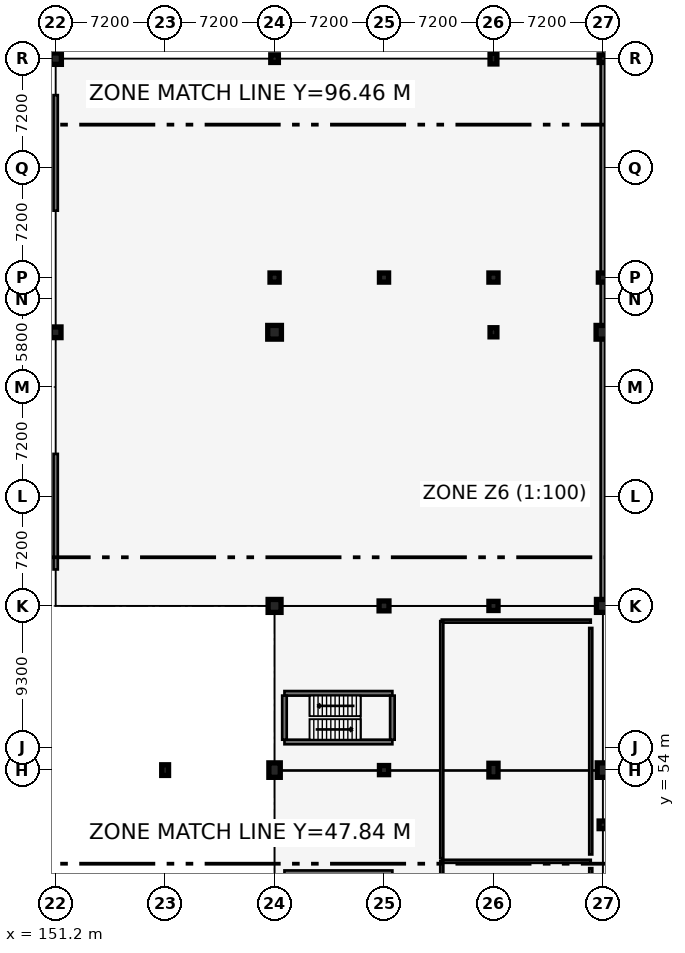
"""IFC4 building model, lengths in metres.
Left out: names, types, materials, properties, quantities, classifications, styles, units other than length and angle.
Written with IfcOpenShell. Run it as: python <this file> out.ifc"""

import sys

from ifc_helpers import new_model, si_unit, direction, frame, frame_2d, origin, origin_2d, place, context, subcontext, project, spatial, rectangle, circle, extrude, element, fill, save


model = new_model("IFC4")
c1 = context("Model", 3, precision=1e-05, world=origin(), true_north=direction((0.0, 1.0)))
c2 = subcontext(c1, "Body", "Model", "MODEL_VIEW")
j1 = project(units=[si_unit("LENGTHUNIT", "METRE"), si_unit("PLANEANGLEUNIT", "RADIAN")], contexts=[c1])
p1 = place(None, origin())
s1 = spatial("IfcSite", under=j1, at=p1, CompositionType="ELEMENT")
p2 = place(p1, origin())
s2 = spatial("IfcBuilding", under=s1, at=p2, CompositionType="ELEMENT")
p3 = place(p2, origin())
s3 = spatial("IfcBuildingStorey", under=s2, at=p3, CompositionType="ELEMENT", Elevation=0.0)
p4 = place(p3, frame((151.2, 82.8, 0.0), z_axis=(0.0, 0.0, 1.0), x_axis=(1.0, 0.0, 0.0)))
e1 = element("IfcColumn", 1, at=p4, inside=s3, PredefinedType="COLUMN", context=c2, shape_type="SweptSolid", body=[
    extrude(rectangle(XDim=0.7, YDim=0.7, at=origin_2d()), origin(), (0.0, 0.0, 1.0), 4.8),
])
p5 = place(p3, frame((151.2, 100.8, 0.0), z_axis=(0.0, 0.0, 1.0), x_axis=(1.0, 0.0, 0.0)))
e2 = element("IfcColumn", 2, at=p5, inside=s3, PredefinedType="COLUMN", context=c2, shape_type="SweptSolid", body=[
    extrude(rectangle(XDim=0.75, YDim=0.75, at=origin_2d()), origin(), (0.0, 0.0, 1.0), 4.8),
])
p6 = place(p3, frame((158.4, 54.0, 0.0), z_axis=(0.0, 0.0, 1.0), x_axis=(1.0, 0.0, 0.0)))
e3 = element("IfcColumn", 3, at=p6, inside=s3, PredefinedType="COLUMN", context=c2, shape_type="SweptSolid", body=[
    extrude(rectangle(XDim=0.45, YDim=0.7, at=origin_2d()), origin(), (0.0, 0.0, 1.0), 4.8),
])
p7 = place(p3, frame((165.6, 54.0, 0.0), z_axis=(0.0, 0.0, 1.0), x_axis=(1.0, 0.0, 0.0)))
e4 = element("IfcColumn", 4, at=p7, inside=s3, PredefinedType="COLUMN", context=c2, shape_type="SweptSolid", body=[
    extrude(rectangle(XDim=0.75, YDim=0.95, at=origin_2d()), origin(), (0.0, 0.0, 1.0), 4.8),
])
p8 = place(p3, frame((165.6, 64.8, 0.0), z_axis=(0.0, 0.0, 1.0), x_axis=(1.0, 0.0, 0.0)))
e5 = element("IfcColumn", 5, at=p8, inside=s3, PredefinedType="COLUMN", context=c2, shape_type="SweptSolid", body=[
    extrude(rectangle(XDim=0.85, YDim=0.85, at=origin_2d()), origin(), (0.0, 0.0, 1.0), 4.8),
])
p9 = place(p3, frame((165.6, 82.8, 0.0), z_axis=(0.0, 0.0, 1.0), x_axis=(1.0, 0.0, 0.0)))
e6 = element("IfcColumn", 6, at=p9, inside=s3, PredefinedType="COLUMN", context=c2, shape_type="SweptSolid", body=[
    extrude(rectangle(XDim=0.9, YDim=0.9, at=origin_2d()), origin(), (0.0, 0.0, 1.0), 4.8),
])
p10 = place(p3, frame((165.6, 86.4, 0.0), z_axis=(0.0, 0.0, 1.0), x_axis=(1.0, 0.0, 0.0)))
e7 = element("IfcColumn", 7, at=p10, inside=s3, PredefinedType="COLUMN", context=c2, shape_type="SweptSolid", body=[
    extrude(rectangle(XDim=0.6, YDim=0.6, at=origin_2d()), origin(), (0.0, 0.0, 1.0), 4.8),
])
p11 = place(p3, frame((165.6, 100.8, 0.0), z_axis=(0.0, 0.0, 1.0), x_axis=(1.0, 0.0, 0.0)))
e8 = element("IfcColumn", 8, at=p11, inside=s3, PredefinedType="COLUMN", context=c2, shape_type="SweptSolid", body=[
    extrude(circle(Radius=0.25, at=origin_2d()), origin(), (0.0, 0.0, 1.0), 4.8),
])
p12 = place(p3, frame((172.8, 54.0, 0.0), z_axis=(0.0, 0.0, 1.0), x_axis=(1.0, 0.0, 0.0)))
e9 = element("IfcColumn", 9, at=p12, inside=s3, PredefinedType="COLUMN", context=c2, shape_type="SweptSolid", body=[
    extrude(rectangle(XDim=0.6, YDim=0.6, at=origin_2d()), origin(), (0.0, 0.0, 1.0), 4.8),
])
p13 = place(p3, frame((172.8, 64.8, 0.0), z_axis=(0.0, 0.0, 1.0), x_axis=(1.0, 0.0, 0.0)))
e10 = element("IfcColumn", 10, at=p13, inside=s3, PredefinedType="COLUMN", context=c2, shape_type="SweptSolid", body=[
    extrude(rectangle(XDim=0.65, YDim=0.65, at=origin_2d()), origin(), (0.0, 0.0, 1.0), 4.8),
])
p14 = place(p3, frame((172.8, 86.4, 0.0), z_axis=(0.0, 0.0, 1.0), x_axis=(1.0, 0.0, 0.0)))
e11 = element("IfcColumn", 11, at=p14, inside=s3, PredefinedType="COLUMN", context=c2, shape_type="SweptSolid", body=[
    extrude(rectangle(XDim=0.6, YDim=0.6, at=origin_2d()), origin(), (0.0, 0.0, 1.0), 4.8),
])
p15 = place(p3, frame((180.0, 54.0, 0.0), z_axis=(0.0, 0.0, 1.0), x_axis=(1.0, 0.0, 0.0)))
e12 = element("IfcColumn", 12, at=p15, inside=s3, PredefinedType="COLUMN", context=c2, shape_type="SweptSolid", body=[
    extrude(rectangle(XDim=0.6, YDim=0.9, at=origin_2d()), origin(), (0.0, 0.0, 1.0), 4.8),
])
p16 = place(p3, frame((180.0, 64.8, 0.0), z_axis=(0.0, 0.0, 1.0), x_axis=(1.0, 0.0, 0.0)))
e13 = element("IfcColumn", 13, at=p16, inside=s3, PredefinedType="COLUMN", context=c2, shape_type="SweptSolid", body=[
    extrude(circle(Radius=0.3, at=origin_2d()), origin(), (0.0, 0.0, 1.0), 4.8),
])
p17 = place(p3, frame((180.0, 82.8, 0.0), z_axis=(0.0, 0.0, 1.0), x_axis=(1.0, 0.0, 0.0)))
e14 = element("IfcColumn", 14, at=p17, inside=s3, PredefinedType="COLUMN", context=c2, shape_type="SweptSolid", body=[
    extrude(rectangle(XDim=0.45, YDim=0.6, at=origin_2d()), origin(), (0.0, 0.0, 1.0), 4.8),
])
p18 = place(p3, frame((180.0, 86.4, 0.0), z_axis=(0.0, 0.0, 1.0), x_axis=(1.0, 0.0, 0.0)))
e15 = element("IfcColumn", 15, at=p18, inside=s3, PredefinedType="COLUMN", context=c2, shape_type="SweptSolid", body=[
    extrude(rectangle(XDim=0.6, YDim=0.6, at=origin_2d()), origin(), (0.0, 0.0, 1.0), 4.8),
])
p19 = place(p3, frame((180.0, 100.8, 0.0), z_axis=(0.0, 0.0, 1.0), x_axis=(1.0, 0.0, 0.0)))
e16 = element("IfcColumn", 16, at=p19, inside=s3, PredefinedType="COLUMN", context=c2, shape_type="SweptSolid", body=[
    extrude(rectangle(XDim=0.45, YDim=0.7, at=origin_2d()), origin(), (0.0, 0.0, 1.0), 4.8),
])
p20 = place(p3, frame((187.2, 50.4, 0.0), z_axis=(0.0, 0.0, 1.0), x_axis=(1.0, 0.0, 0.0)))
e17 = element("IfcColumn", 17, at=p20, inside=s3, PredefinedType="COLUMN", context=c2, shape_type="SweptSolid", body=[
    extrude(rectangle(XDim=0.5, YDim=0.5, at=origin_2d()), origin(), (0.0, 0.0, 1.0), 4.8),
])
p21 = place(p3, frame((187.2, 54.0, 0.0), z_axis=(0.0, 0.0, 1.0), x_axis=(1.0, 0.0, 0.0)))
e18 = element("IfcColumn", 18, at=p21, inside=s3, PredefinedType="COLUMN", context=c2, shape_type="SweptSolid", body=[
    extrude(rectangle(XDim=0.75, YDim=0.95, at=origin_2d()), origin(), (0.0, 0.0, 1.0), 4.8),
])
p22 = place(p3, frame((187.2, 64.8, 0.0), z_axis=(0.0, 0.0, 1.0), x_axis=(1.0, 0.0, 0.0)))
e19 = element("IfcColumn", 19, at=p22, inside=s3, PredefinedType="COLUMN", context=c2, shape_type="SweptSolid", body=[
    extrude(rectangle(XDim=0.85, YDim=0.85, at=origin_2d()), origin(), (0.0, 0.0, 1.0), 4.8),
])
p23 = place(p3, frame((187.2, 82.8, 0.0), z_axis=(0.0, 0.0, 1.0), x_axis=(1.0, 0.0, 0.0)))
e20 = element("IfcColumn", 20, at=p23, inside=s3, PredefinedType="COLUMN", context=c2, shape_type="SweptSolid", body=[
    extrude(rectangle(XDim=0.9, YDim=0.9, at=origin_2d()), origin(), (0.0, 0.0, 1.0), 4.8),
])
p24 = place(p3, frame((187.2, 86.4, 0.0), z_axis=(0.0, 0.0, 1.0), x_axis=(1.0, 0.0, 0.0)))
e21 = element("IfcColumn", 21, at=p24, inside=s3, PredefinedType="COLUMN", context=c2, shape_type="SweptSolid", body=[
    extrude(rectangle(XDim=0.6, YDim=0.6, at=origin_2d()), origin(), (0.0, 0.0, 1.0), 4.8),
])
p25 = place(p3, frame((187.2, 100.8, 0.0), z_axis=(0.0, 0.0, 1.0), x_axis=(1.0, 0.0, 0.0)))
e22 = element("IfcColumn", 22, at=p25, inside=s3, PredefinedType="COLUMN", context=c2, shape_type="SweptSolid", body=[
    extrude(circle(Radius=0.25, at=origin_2d()), origin(), (0.0, 0.0, 1.0), 4.8),
])
p26 = place(p3, frame((187.2, 64.8, 0.0), z_axis=(0.0, 0.0, 1.0), x_axis=(0.0, 1.0, 0.0)))
e23 = element("IfcWall", 23, at=p26, inside=s3, PredefinedType="SOLIDWALL", context=c2, shape_type="SweptSolid", body=[
    extrude(rectangle(XDim=36.0, YDim=0.3, at=frame_2d((18.0, 0.0))), origin(), (0.0, 0.0, 1.0), 4.25),
])
p27 = place(p26, frame((6.2, 0.0, 0.0)))
e24 = element("IfcOpeningElement", 24, at=p27, cuts=e23, PredefinedType="OPENING", context=c2, shape_type="SweptSolid", body=[
    extrude(rectangle(XDim=3.6, YDim=2.6, at=frame_2d((1.8, 1.3))), frame((0.0, 0.16, 0.0), z_axis=(0.0, -1.0, 0.0), x_axis=(1.0, 0.0, 0.0)), (0.0, 0.0, 1.0), 0.32),
])
p28 = place(p26, frame((12.0, 0.0, 2.4)))
e25 = element("IfcOpeningElement", 25, at=p28, cuts=e23, PredefinedType="OPENING", context=c2, shape_type="SweptSolid", body=[
    extrude(rectangle(XDim=1.8, YDim=1.15, at=frame_2d((0.9, 0.575))), frame((0.0, 0.16, 0.0), z_axis=(0.0, -1.0, 0.0), x_axis=(1.0, 0.0, 0.0)), (0.0, 0.0, 1.0), 0.32),
])
p29 = place(p26, frame((18.5, 0.0, 2.4)))
e26 = element("IfcOpeningElement", 26, at=p29, cuts=e23, PredefinedType="OPENING", context=c2, shape_type="SweptSolid", body=[
    extrude(rectangle(XDim=1.8, YDim=1.15, at=frame_2d((0.9, 0.575))), frame((0.0, 0.16, 0.0), z_axis=(0.0, -1.0, 0.0), x_axis=(1.0, 0.0, 0.0)), (0.0, 0.0, 1.0), 0.32),
])
p30 = place(p26, frame((24.5, 0.0, 2.4)))
e27 = element("IfcOpeningElement", 27, at=p30, cuts=e23, PredefinedType="OPENING", context=c2, shape_type="SweptSolid", body=[
    extrude(rectangle(XDim=1.8, YDim=1.15, at=frame_2d((0.9, 0.575))), frame((0.0, 0.16, 0.0), z_axis=(0.0, -1.0, 0.0), x_axis=(1.0, 0.0, 0.0)), (0.0, 0.0, 1.0), 0.32),
])
p31 = place(p26, frame((30.5, 0.0, 2.4)))
e28 = element("IfcOpeningElement", 28, at=p31, cuts=e23, PredefinedType="OPENING", context=c2, shape_type="SweptSolid", body=[
    extrude(rectangle(XDim=1.8, YDim=1.15, at=frame_2d((0.9, 0.575))), frame((0.0, 0.16, 0.0), z_axis=(0.0, -1.0, 0.0), x_axis=(1.0, 0.0, 0.0)), (0.0, 0.0, 1.0), 0.32),
])
p32 = place(p3, frame((216.0, 64.8, 0.0), z_axis=(0.0, 0.0, 1.0), x_axis=(-1.0, 0.0, 0.0)))
e29 = element("IfcWall", 29, at=p32, inside=s3, PredefinedType="SOLIDWALL", context=c2, shape_type="SweptSolid", body=[
    extrude(rectangle(XDim=28.8, YDim=0.3, at=frame_2d((14.4, 0.0))), origin(), (0.0, 0.0, 1.0), 4.25),
])
p33 = place(p32, frame((2.2, 0.0, 0.72)))
e30 = element("IfcOpeningElement", 30, at=p33, cuts=e29, PredefinedType="OPENING", context=c2, shape_type="SweptSolid", body=[
    extrude(rectangle(XDim=1.5, YDim=2.1, at=frame_2d((0.75, 1.05))), frame((0.0, 0.16, 0.0), z_axis=(0.0, -1.0, 0.0), x_axis=(1.0, 0.0, 0.0)), (0.0, 0.0, 1.0), 0.32),
])
p34 = place(p32, frame((9.4, 0.0, 0.72)))
e31 = element("IfcOpeningElement", 31, at=p34, cuts=e29, PredefinedType="OPENING", context=c2, shape_type="SweptSolid", body=[
    extrude(rectangle(XDim=1.65, YDim=2.1, at=frame_2d((0.825, 1.05))), frame((0.0, 0.16, 0.0), z_axis=(0.0, -1.0, 0.0), x_axis=(1.0, 0.0, 0.0)), (0.0, 0.0, 1.0), 0.32),
])
p35 = place(p32, frame((16.6, 0.0, 0.72)))
e32 = element("IfcOpeningElement", 32, at=p35, cuts=e29, PredefinedType="OPENING", context=c2, shape_type="SweptSolid", body=[
    extrude(rectangle(XDim=1.8, YDim=2.15, at=frame_2d((0.9, 1.075))), frame((0.0, 0.16, 0.0), z_axis=(0.0, -1.0, 0.0), x_axis=(1.0, 0.0, 0.0)), (0.0, 0.0, 1.0), 0.32),
])
p36 = place(p32, frame((6.2, 0.0, 0.0)))
e33 = element("IfcOpeningElement", 33, at=p36, cuts=e29, PredefinedType="OPENING", context=c2, shape_type="SweptSolid", body=[
    extrude(rectangle(XDim=2.0, YDim=2.35, at=frame_2d((1.0, 1.175))), frame((0.0, 0.16, 0.0), z_axis=(0.0, -1.0, 0.0), x_axis=(1.0, 0.0, 0.0)), (0.0, 0.0, 1.0), 0.32),
])
p37 = place(p3, frame((151.2, 67.2, 0.0), z_axis=(0.0, 0.0, 1.0), x_axis=(0.0, 1.0, 0.0)))
e34 = element("IfcWall", 34, at=p37, inside=s3, PredefinedType="SOLIDWALL", context=c2, shape_type="SweptSolid", body=[
    extrude(rectangle(XDim=7.6, YDim=0.28, at=frame_2d((3.8, 0.0))), origin(), (0.0, 0.0, 1.0), 4.15),
])
p38 = place(p37, frame((2.0, 0.0, 0.0)))
e35 = element("IfcOpeningElement", 35, at=p38, cuts=e34, PredefinedType="OPENING", context=c2, shape_type="SweptSolid", body=[
    extrude(rectangle(XDim=3.6, YDim=2.6, at=frame_2d((1.8, 1.3))), frame((0.0, 0.15, 0.0), z_axis=(0.0, -1.0, 0.0), x_axis=(1.0, 0.0, 0.0)), (0.0, 0.0, 1.0), 0.3),
])
p39 = place(p3, frame((151.2, 90.8, 0.0), z_axis=(0.0, 0.0, 1.0), x_axis=(0.0, 1.0, 0.0)))
e36 = element("IfcWall", 36, at=p39, inside=s3, PredefinedType="SOLIDWALL", context=c2, shape_type="SweptSolid", body=[
    extrude(rectangle(XDim=7.6, YDim=0.28, at=frame_2d((3.8, 0.0))), origin(), (0.0, 0.0, 1.0), 4.15),
])
p40 = place(p39, frame((2.0, 0.0, 0.0)))
e37 = element("IfcOpeningElement", 37, at=p40, cuts=e36, PredefinedType="OPENING", context=c2, shape_type="SweptSolid", body=[
    extrude(rectangle(XDim=3.6, YDim=2.6, at=frame_2d((1.8, 1.3))), frame((0.0, 0.15, 0.0), z_axis=(0.0, -1.0, 0.0), x_axis=(1.0, 0.0, 0.0)), (0.0, 0.0, 1.0), 0.3),
])
for number, where, z_axis, x_axis in (
    (38, (173.35, 47.25, 0.0), (0.0, 0.0, 1.0), (-1.0, 0.0, 0.0)),
    (39, (166.25, 55.85, 0.0), (0.0, 0.0, 1.0), (1.0, 0.0, 0.0)),
    (40, (173.35, 59.05, 0.0), (0.0, 0.0, 1.0), (-1.0, 0.0, 0.0)),
):
    element("IfcWall", number, at=place(p3, frame(where, z_axis=z_axis, x_axis=x_axis)), inside=s3, PredefinedType="SHEAR", context=c2, shape_type="SweptSolid", body=[
        extrude(rectangle(XDim=7.1, YDim=0.3, at=frame_2d((3.55, 0.0))), origin(), (0.0, 0.0, 1.0), 4.525),
    ])
p41 = place(p3, frame((173.35, 56.0, 0.0), z_axis=(0.0, 0.0, 1.0), x_axis=(0.0, 1.0, 0.0)))
e41 = element("IfcWall", 41, at=p41, inside=s3, PredefinedType="SHEAR", context=c2, shape_type="SweptSolid", body=[
    extrude(rectangle(XDim=2.9, YDim=0.3, at=frame_2d((1.45, 0.0))), origin(), (0.0, 0.0, 1.0), 4.525),
])
p42 = place(p3, frame((166.25, 58.9, 0.0), z_axis=(0.0, 0.0, 1.0), x_axis=(0.0, -1.0, 0.0)))
e42 = element("IfcWall", 42, at=p42, inside=s3, PredefinedType="SHEAR", context=c2, shape_type="SweptSolid", body=[
    extrude(rectangle(XDim=2.9, YDim=0.3, at=frame_2d((1.45, 0.0))), origin(), (0.0, 0.0, 1.0), 4.525),
])
p43 = place(p42, frame((0.75, 0.0, 0.0)))
e43 = element("IfcOpeningElement", 43, at=p43, cuts=e42, PredefinedType="OPENING", context=c2, shape_type="SweptSolid", body=[
    extrude(rectangle(XDim=1.05, YDim=2.15, at=frame_2d((0.525, 1.075))), frame((0.0, 0.16, 0.0), z_axis=(0.0, -1.0, 0.0), x_axis=(1.0, 0.0, 0.0)), (0.0, 0.0, 1.0), 0.32),
])
p44 = place(p3, frame((176.6, 48.0, 0.0), z_axis=(0.0, 0.0, 1.0), x_axis=(1.0, 0.0, 0.0)))
e44 = element("IfcWall", 44, at=p44, inside=s3, PredefinedType="SOLIDWALL", context=c2, shape_type="SweptSolid", body=[
    extrude(rectangle(XDim=9.8, YDim=0.2, at=frame_2d((4.9, 0.0))), origin(), (0.0, 0.0, 1.0), 4.0),
])
p45 = place(p3, frame((186.4, 27.25, 0.0), z_axis=(0.0, 0.0, 1.0), x_axis=(0.0, 1.0, 0.0)))
e45 = element("IfcWall", 45, at=p45, inside=s3, PredefinedType="SOLIDWALL", context=c2, shape_type="SweptSolid", body=[
    extrude(rectangle(XDim=20.3, YDim=0.2, at=frame_2d((10.15, 0.0))), origin(), (0.0, 0.0, 1.0), 3.657),
])
p46 = place(p3, frame((176.6, 48.0, 0.0), z_axis=(0.0, 0.0, 1.0), x_axis=(0.0, -1.0, 0.0)))
e46 = element("IfcWall", 46, at=p46, inside=s3, PredefinedType="SOLIDWALL", context=c2, shape_type="SweptSolid", body=[
    extrude(rectangle(XDim=21.2, YDim=0.2, at=frame_2d((10.6, 0.0))), origin(), (0.0, 0.0, 1.0), 3.757),
])
p47 = place(p46, frame((9.7, 0.0, 0.0)))
e47 = element("IfcOpeningElement", 47, at=p47, cuts=e46, PredefinedType="OPENING", context=c2, shape_type="SweptSolid", body=[
    extrude(rectangle(XDim=1.8, YDim=2.2, at=frame_2d((0.9, 1.1))), frame((0.0, 0.11, 0.0), z_axis=(0.0, -1.0, 0.0), x_axis=(1.0, 0.0, 0.0)), (0.0, 0.0, 1.0), 0.22),
])
p48 = place(p3, frame((176.6, 63.8, 0.0), z_axis=(0.0, 0.0, 1.0), x_axis=(1.0, 0.0, 0.0)))
e48 = element("IfcWall", 48, at=p48, inside=s3, PredefinedType="SOLIDWALL", context=c2, shape_type="SweptSolid", body=[
    extrude(rectangle(XDim=9.8, YDim=0.2, at=frame_2d((4.9, 0.0))), origin(), (0.0, 0.0, 1.0), 4.0),
])
p49 = place(p3, frame((186.4, 48.45, 0.0), z_axis=(0.0, 0.0, 1.0), x_axis=(0.0, 1.0, 0.0)))
e49 = element("IfcWall", 49, at=p49, inside=s3, PredefinedType="SOLIDWALL", context=c2, shape_type="SweptSolid", body=[
    extrude(rectangle(XDim=14.9, YDim=0.2, at=frame_2d((7.45, 0.0))), origin(), (0.0, 0.0, 1.0), 4.0),
])
p50 = place(p3, frame((176.6, 63.8, 0.0), z_axis=(0.0, 0.0, 1.0), x_axis=(0.0, -1.0, 0.0)))
e50 = element("IfcWall", 50, at=p50, inside=s3, PredefinedType="SOLIDWALL", context=c2, shape_type="SweptSolid", body=[
    extrude(rectangle(XDim=15.6, YDim=0.2, at=frame_2d((7.8, 0.0))), origin(), (0.0, 0.0, 1.0), 4.0),
])
p51 = place(p50, frame((6.9, 0.0, 0.0)))
e51 = element("IfcOpeningElement", 51, at=p51, cuts=e50, PredefinedType="OPENING", context=c2, shape_type="SweptSolid", body=[
    extrude(rectangle(XDim=1.8, YDim=2.2, at=frame_2d((0.9, 1.1))), frame((0.0, 0.11, 0.0), z_axis=(0.0, -1.0, 0.0), x_axis=(1.0, 0.0, 0.0)), (0.0, 0.0, 1.0), 0.22),
])
p52 = place(p27, origin())
e52 = element("IfcDoor", 52, at=p52, inside=s3, OperationType="SLIDING_TO_RIGHT", PredefinedType="GATE", context=c2, shape_type="SweptSolid", body=[
    extrude(rectangle(XDim=3.6, YDim=2.6, at=frame_2d((1.8, 1.3))), frame((0.0, 0.025, 0.0), z_axis=(0.0, -1.0, 0.0), x_axis=(1.0, 0.0, 0.0)), (0.0, 0.0, 1.0), 0.05),
])
fill(e24, e52)
p53 = place(p28, origin())
e53 = element("IfcWindow", 53, at=p53, inside=s3, PartitioningType="SINGLE_PANEL", PredefinedType="WINDOW", context=c2, shape_type="SweptSolid", body=[
    extrude(rectangle(XDim=1.8, YDim=1.15, at=frame_2d((0.9, 0.575))), frame((0.0, 0.03, 0.0), z_axis=(0.0, -1.0, 0.0), x_axis=(1.0, 0.0, 0.0)), (0.0, 0.0, 1.0), 0.06),
])
fill(e25, e53)
p54 = place(p29, origin())
e54 = element("IfcWindow", 54, at=p54, inside=s3, PartitioningType="SINGLE_PANEL", PredefinedType="WINDOW", context=c2, shape_type="SweptSolid", body=[
    extrude(rectangle(XDim=1.8, YDim=1.15, at=frame_2d((0.9, 0.575))), frame((0.0, 0.03, 0.0), z_axis=(0.0, -1.0, 0.0), x_axis=(1.0, 0.0, 0.0)), (0.0, 0.0, 1.0), 0.06),
])
fill(e26, e54)
p55 = place(p30, origin())
e55 = element("IfcWindow", 55, at=p55, inside=s3, PartitioningType="SINGLE_PANEL", PredefinedType="WINDOW", context=c2, shape_type="SweptSolid", body=[
    extrude(rectangle(XDim=1.8, YDim=1.15, at=frame_2d((0.9, 0.575))), frame((0.0, 0.03, 0.0), z_axis=(0.0, -1.0, 0.0), x_axis=(1.0, 0.0, 0.0)), (0.0, 0.0, 1.0), 0.06),
])
fill(e27, e55)
p56 = place(p31, origin())
e56 = element("IfcWindow", 56, at=p56, inside=s3, PartitioningType="SINGLE_PANEL", PredefinedType="WINDOW", context=c2, shape_type="SweptSolid", body=[
    extrude(rectangle(XDim=1.8, YDim=1.15, at=frame_2d((0.9, 0.575))), frame((0.0, 0.03, 0.0), z_axis=(0.0, -1.0, 0.0), x_axis=(1.0, 0.0, 0.0)), (0.0, 0.0, 1.0), 0.06),
])
fill(e28, e56)
p57 = place(p38, origin())
e57 = element("IfcDoor", 57, at=p57, inside=s3, OperationType="SLIDING_TO_RIGHT", PredefinedType="GATE", context=c2, shape_type="SweptSolid", body=[
    extrude(rectangle(XDim=3.6, YDim=2.6, at=frame_2d((1.8, 1.3))), frame((0.0, 0.025, 0.0), z_axis=(0.0, -1.0, 0.0), x_axis=(1.0, 0.0, 0.0)), (0.0, 0.0, 1.0), 0.05),
])
fill(e35, e57)
p58 = place(p40, origin())
e58 = element("IfcDoor", 58, at=p58, inside=s3, OperationType="SLIDING_TO_RIGHT", PredefinedType="GATE", context=c2, shape_type="SweptSolid", body=[
    extrude(rectangle(XDim=3.6, YDim=2.6, at=frame_2d((1.8, 1.3))), frame((0.0, 0.025, 0.0), z_axis=(0.0, -1.0, 0.0), x_axis=(1.0, 0.0, 0.0)), (0.0, 0.0, 1.0), 0.05),
])
fill(e37, e58)
p59 = place(p43, frame((1.05, 0.0, 0.0), z_axis=(0.0, 0.0, 1.0), x_axis=(-1.0, 0.0, 0.0)))
e59 = element("IfcDoor", 59, at=p59, inside=s3, OperationType="SINGLE_SWING_LEFT", PredefinedType="DOOR", context=c2, shape_type="SweptSolid", body=[
    extrude(rectangle(XDim=1.05, YDim=2.15, at=frame_2d((0.525, 1.075))), frame((0.0, 0.025, 0.0), z_axis=(0.0, -1.0, 0.0), x_axis=(1.0, 0.0, 0.0)), (0.0, 0.0, 1.0), 0.05),
])
fill(e43, e59)
p60 = place(p51, origin())
e60 = element("IfcDoor", 60, at=p60, inside=s3, OperationType="DOUBLE_SWING_LEFT", PredefinedType="DOOR", context=c2, shape_type="SweptSolid", body=[
    extrude(rectangle(XDim=1.8, YDim=2.2, at=frame_2d((0.9, 1.1))), frame((0.0, 0.025, 0.0), z_axis=(0.0, -1.0, 0.0), x_axis=(1.0, 0.0, 0.0)), (0.0, 0.0, 1.0), 0.05),
])
fill(e51, e60)
save(model, sys.argv[1])
